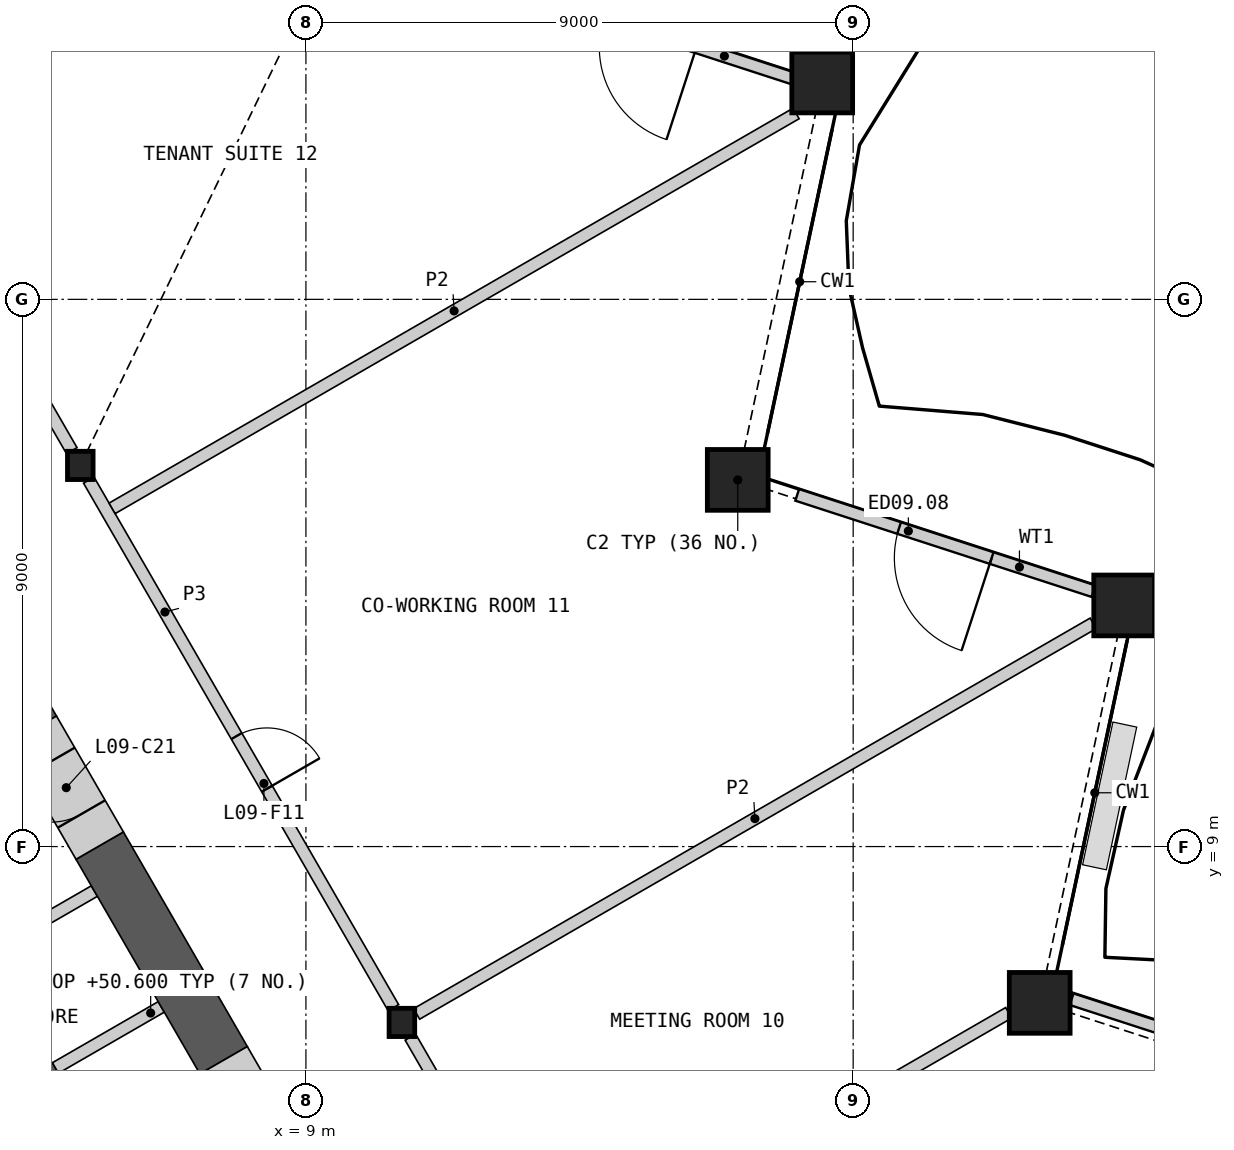
"""IFC4 building model, lengths in metres.
Left out: names, types, materials, properties, quantities, classifications, styles, units other than length and angle.
Written with IfcOpenShell. Run it as: python <this file> out.ifc"""

import sys

from ifc_helpers import new_model, si_unit, direction, frame, frame_2d, origin, origin_2d, place, context, subcontext, project, spatial, polyline, rectangle, hollow_rectangle, i_section, outline, extrude, element, fill, save


model = new_model("IFC4")
c1 = context("Model", 3, precision=1e-05, world=origin(), true_north=direction((0.0, 1.0)))
c2 = subcontext(c1, "Body", "Model", "MODEL_VIEW")
j1 = project(units=[si_unit("LENGTHUNIT", "METRE"), si_unit("PLANEANGLEUNIT", "RADIAN")], contexts=[c1])
p1 = place(None, origin())
s1 = spatial("IfcSite", under=j1, at=p1, CompositionType="ELEMENT")
p2 = place(p1, origin())
s2 = spatial("IfcBuilding", under=s1, at=p2, CompositionType="ELEMENT")
p3 = place(p2, frame((0.0, 0.0, 46.8)))
s3 = spatial("IfcBuildingStorey", under=s2, at=p3, CompositionType="ELEMENT", Elevation=46.8)
for number, where, z_axis, x_axis in (
    (1, (21.068, 6.429, 0.0), (0.0, 0.0, 1.0), (1.0, 0.0, 0.0)),
    (2, (22.457, 12.966, 0.0), (0.0, 0.0, 1.0), (1.0, 0.0, 0.0)),
    (3, (16.102, 15.031, 0.0), (0.0, 0.0, 1.0), (1.0, 0.0, 0.0)),
    (4, (17.491, 21.567, 0.0), (0.0, 0.0, 1.0), (1.0, 0.0, 0.0)),
):
    element("IfcColumn", number, at=place(p3, frame(where, z_axis=z_axis, x_axis=x_axis)), inside=s3, PredefinedType="COLUMN", context=c2, shape_type="SweptSolid", body=[
        extrude(hollow_rectangle(XDim=1.0, YDim=1.0, WallThickness=0.07, at=origin_2d()), origin(), (0.0, 0.0, 1.0), 4.2),
    ])
for number, where, z_axis, x_axis in (
    (5, (10.578, 6.107, 0.0), (0.0, 0.0, 1.0), (1.0, 0.0, 0.0)),
    (6, (5.289, 15.269, 0.0), (0.0, 0.0, 1.0), (1.0, 0.0, 0.0)),
):
    element("IfcColumn", number, at=place(p3, frame(where, z_axis=z_axis, x_axis=x_axis)), inside=s3, PredefinedType="COLUMN", context=c2, shape_type="SweptSolid", body=[
        extrude(i_section(OverallWidth=0.421, OverallDepth=0.465, WebThickness=0.045, FlangeThickness=0.072, at=origin_2d()), origin(), (0.0, 0.0, 1.0), 4.2),
    ])
p4 = place(p3, frame((26.899, 4.765, 0.0), z_axis=(0.0, 0.0, 1.0), x_axis=(-0.951054004345, 0.309024725255, 0.0)))
e7 = element("IfcWall", 7, at=p4, inside=s3, PredefinedType="SOLIDWALL", context=c2, shape_type="SweptSolid", body=[
    extrude(rectangle(XDim=5.579, YDim=0.2, at=frame_2d((2.79, 0.0))), origin(), (0.0, 0.0, 1.0), 3.189),
])
p5 = place(p4, frame((1.86, 0.0, 0.0)))
e8 = element("IfcOpeningElement", 8, at=p5, cuts=e7, PredefinedType="OPENING", context=c2, shape_type="SweptSolid", body=[
    extrude(rectangle(XDim=1.6, YDim=2.4, at=frame_2d((0.8, 1.2))), frame((0.0, 0.11, 0.0), z_axis=(0.0, -1.0, 0.0), x_axis=(1.0, 0.0, 0.0)), (0.0, 0.0, 1.0), 0.22),
])
p6 = place(p3, frame((21.953, 13.2, 0.0), z_axis=(0.0, 0.0, 1.0), x_axis=(-0.951052624268, 0.309028972547, 0.0)))
e9 = element("IfcWall", 9, at=p6, inside=s3, PredefinedType="SOLIDWALL", context=c2, shape_type="SweptSolid", body=[
    extrude(rectangle(XDim=5.124, YDim=0.2, at=frame_2d((2.562, 0.0))), origin(), (0.0, 0.0, 1.0), 3.189),
])
p7 = place(p6, frame((1.762, 0.0, 0.0)))
e10 = element("IfcOpeningElement", 10, at=p7, cuts=e9, PredefinedType="OPENING", context=c2, shape_type="SweptSolid", body=[
    extrude(rectangle(XDim=1.6, YDim=2.4, at=frame_2d((0.8, 1.2))), frame((0.0, 0.11, 0.0), z_axis=(0.0, -1.0, 0.0), x_axis=(1.0, 0.0, 0.0)), (0.0, 0.0, 1.0), 0.22),
])
p8 = place(p3, frame((17.1, 21.605, 0.0), z_axis=(0.0, 0.0, 1.0), x_axis=(-0.951048073862, 0.309042976306, 0.0)))
e11 = element("IfcWall", 11, at=p8, inside=s3, PredefinedType="SOLIDWALL", context=c2, shape_type="SweptSolid", body=[
    extrude(rectangle(XDim=5.124, YDim=0.2, at=frame_2d((2.562, 0.0))), origin(), (0.0, 0.0, 1.0), 3.189),
])
p9 = place(p8, frame((1.762, 0.0, 0.0)))
e12 = element("IfcOpeningElement", 12, at=p9, cuts=e11, PredefinedType="OPENING", context=c2, shape_type="SweptSolid", body=[
    extrude(rectangle(XDim=1.6, YDim=2.4, at=frame_2d((0.8, 1.2))), frame((0.0, 0.11, 0.0), z_axis=(0.0, -1.0, 0.0), x_axis=(1.0, 0.0, 0.0)), (0.0, 0.0, 1.0), 0.22),
])
p10 = place(p3, origin())
e13 = element("IfcWall", 13, at=p10, inside=s3, PredefinedType="SHEAR", context=c2, shape_type="SweptSolid", body=[
    extrude(outline(polyline([(2.66, 4.192), (4.831, 5.445), (8.231, -0.444), (6.061, -1.697), (5.96, -1.524), (7.952, -0.374), (6.952, 1.358), (4.96, 0.208), (4.861, 0.381), (6.852, 1.531), (5.852, 3.263), (3.861, 2.113), (3.76, 2.287), (5.752, 3.437), (4.752, 5.169), (2.76, 4.019), (2.66, 4.192)])), origin(), (0.0, 0.0, 1.0), 3.8),
])
p11 = place(p3, frame((5.817, -1.476, 0.0), z_axis=(0.0, 0.0, 1.0), x_axis=(-0.500002616675, 0.866023893041, 0.0)))
e14 = element("IfcWall", 14, at=p11, inside=s3, PredefinedType="SOLIDWALL", context=c2, shape_type="SweptSolid", body=[
    extrude(rectangle(XDim=8.373, YDim=0.2, at=frame_2d((4.187, 0.0))), origin(), (0.0, 0.0, 1.0), 3.8),
])
p12 = place(p11, frame((0.337, 0.0, 0.0)))
e15 = element("IfcOpeningElement", 15, at=p12, cuts=e14, PredefinedType="OPENING", context=c2, shape_type="SweptSolid", body=[
    extrude(rectangle(XDim=1.1, YDim=2.1, at=frame_2d((0.55, 1.05))), frame((0.0, 0.11, 0.0), z_axis=(0.0, -1.0, 0.0), x_axis=(1.0, 0.0, 0.0)), (0.0, 0.0, 1.0), 0.22),
])
p13 = place(p11, frame((2.537, 0.0, 0.0)))
e16 = element("IfcOpeningElement", 16, at=p13, cuts=e14, PredefinedType="OPENING", context=c2, shape_type="SweptSolid", body=[
    extrude(rectangle(XDim=1.1, YDim=2.1, at=frame_2d((0.55, 1.05))), frame((0.0, 0.11, 0.0), z_axis=(0.0, -1.0, 0.0), x_axis=(1.0, 0.0, 0.0)), (0.0, 0.0, 1.0), 0.22),
])
p14 = place(p11, frame((4.737, 0.0, 0.0)))
e17 = element("IfcOpeningElement", 17, at=p14, cuts=e14, PredefinedType="OPENING", context=c2, shape_type="SweptSolid", body=[
    extrude(rectangle(XDim=1.1, YDim=2.1, at=frame_2d((0.55, 1.05))), frame((0.0, 0.11, 0.0), z_axis=(0.0, -1.0, 0.0), x_axis=(1.0, 0.0, 0.0)), (0.0, 0.0, 1.0), 0.22),
])
p15 = place(p11, frame((7.037, 0.0, 0.0)))
e18 = element("IfcOpeningElement", 18, at=p15, cuts=e14, PredefinedType="OPENING", context=c2, shape_type="SweptSolid", body=[
    extrude(rectangle(XDim=0.9, YDim=2.1, at=frame_2d((0.45, 1.05))), frame((0.0, 0.11, 0.0), z_axis=(0.0, -1.0, 0.0), x_axis=(1.0, 0.0, 0.0)), (0.0, 0.0, 1.0), 0.22),
])
p16 = place(p3, frame((4.881, 5.358, 0.0), z_axis=(0.0, 0.0, 1.0), x_axis=(0.866035824272, 0.499981950752, 0.0)))
e19 = element("IfcWall", 19, at=p16, inside=s3, PredefinedType="SHEAR", context=c2, shape_type="SweptSolid", body=[
    extrude(rectangle(XDim=2.009, YDim=0.2, at=frame_2d((1.004, 0.0))), origin(), (0.0, 0.0, 1.0), 3.8),
])
p17 = place(p3, frame((3.781, 7.263, 0.0), z_axis=(0.0, 0.0, 1.0), x_axis=(0.865983199114, 0.50007309351, 0.0)))
e20 = element("IfcWall", 20, at=p17, inside=s3, PredefinedType="SHEAR", context=c2, shape_type="SweptSolid", body=[
    extrude(rectangle(XDim=2.009, YDim=0.2, at=frame_2d((1.004, 0.0))), origin(), (0.0, 0.0, 1.0), 3.8),
])
p18 = place(p3, frame((7.646, 5.486, 0.0), z_axis=(0.0, 0.0, 1.0), x_axis=(-0.499978218965, 0.866037978706, 0.0)))
e21 = element("IfcWall", 21, at=p18, inside=s3, PredefinedType="SHEAR", context=c2, shape_type="SweptSolid", body=[
    extrude(rectangle(XDim=4.076, YDim=0.9, at=frame_2d((2.038, 0.0))), origin(), (0.0, 0.0, 1.0), 3.8),
])
p19 = place(p3, frame((4.509, 10.921, 0.0), z_axis=(0.0, 0.0, 1.0), x_axis=(-0.49999004381, 0.866031151917, 0.0)))
e22 = element("IfcWall", 22, at=p19, inside=s3, PredefinedType="SHEAR", context=c2, shape_type="SweptSolid", body=[
    extrude(rectangle(XDim=3.975, YDim=0.9, at=frame_2d((1.988, 0.0))), origin(), (0.0, 0.0, 1.0), 3.8),
])
p20 = place(p3, frame((8.747, 3.58, 0.0), z_axis=(0.0, 0.0, 1.0), x_axis=(-0.50002983664, 0.866008176907, 0.0)))
e23 = element("IfcWall", 23, at=p20, inside=s3, PredefinedType="SHEAR", context=c2, shape_type="SweptSolid", body=[
    extrude(rectangle(XDim=2.2, YDim=0.9, at=frame_2d((1.1, 0.0))), origin(), (0.0, 0.0, 1.0), 3.8),
])
p21 = place(p20, frame((0.6, 0.0, 0.0)))
e24 = element("IfcOpeningElement", 24, at=p21, cuts=e23, PredefinedType="OPENING", context=c2, shape_type="SweptSolid", body=[
    extrude(rectangle(XDim=1.0, YDim=2.1, at=frame_2d((0.5, 1.05))), frame((0.0, 0.46, 0.0), z_axis=(0.0, -1.0, 0.0), x_axis=(1.0, 0.0, 0.0)), (0.0, 0.0, 1.0), 0.92),
])
p22 = place(p3, frame((5.608, 9.016, 0.0), z_axis=(0.0, 0.0, 1.0), x_axis=(-0.499994660107, 0.866028486751, 0.0)))
e25 = element("IfcWall", 25, at=p22, inside=s3, PredefinedType="SHEAR", context=c2, shape_type="SweptSolid", body=[
    extrude(rectangle(XDim=2.2, YDim=0.9, at=frame_2d((1.1, 0.0))), origin(), (0.0, 0.0, 1.0), 3.8),
])
p23 = place(p22, frame((0.6, 0.0, 0.0)))
e26 = element("IfcOpeningElement", 26, at=p23, cuts=e25, PredefinedType="OPENING", context=c2, shape_type="SweptSolid", body=[
    extrude(rectangle(XDim=1.0, YDim=2.1, at=frame_2d((0.5, 1.05))), frame((0.0, 0.46, 0.0), z_axis=(0.0, -1.0, 0.0), x_axis=(1.0, 0.0, 0.0)), (0.0, 0.0, 1.0), 0.92),
])
p24 = place(p3, frame((10.719, 5.865, 0.0), z_axis=(0.0, 0.0, 1.0), x_axis=(0.49999175339, -0.866030164915, 0.0)))
e27 = element("IfcWall", 27, at=p24, inside=s3, PredefinedType="PARTITIONING", context=c2, shape_type="SweptSolid", body=[
    extrude(rectangle(XDim=10.019, YDim=0.2, at=frame_2d((5.009, 0.0))), origin(), (0.0, 0.0, 1.0), 3.8),
])
p25 = place(p24, frame((6.464, 0.0, 0.0)))
e28 = element("IfcOpeningElement", 28, at=p25, cuts=e27, PredefinedType="OPENING", context=c2, shape_type="SweptSolid", body=[
    extrude(rectangle(XDim=1.0, YDim=2.1, at=frame_2d((0.5, 1.05))), frame((0.0, 0.11, 0.0), z_axis=(0.0, -1.0, 0.0), x_axis=(1.0, 0.0, 0.0)), (0.0, 0.0, 1.0), 0.22),
])
p26 = place(p24, frame((1.753, 0.0, 0.0)))
e29 = element("IfcOpeningElement", 29, at=p26, cuts=e27, PredefinedType="OPENING", context=c2, shape_type="SweptSolid", body=[
    extrude(rectangle(XDim=1.0, YDim=2.1, at=frame_2d((0.5, 1.05))), frame((0.0, 0.11, 0.0), z_axis=(0.0, -1.0, 0.0), x_axis=(1.0, 0.0, 0.0)), (0.0, 0.0, 1.0), 0.22),
])
p27 = place(p3, frame((5.429, 15.026, 0.0), z_axis=(0.0, 0.0, 1.0), x_axis=(0.50001002959, -0.86601961312, 0.0)))
e30 = element("IfcWall", 30, at=p27, inside=s3, PredefinedType="PARTITIONING", context=c2, shape_type="SweptSolid", body=[
    extrude(rectangle(XDim=10.019, YDim=0.2, at=frame_2d((5.009, 0.0))), origin(), (0.0, 0.0, 1.0), 3.8),
])
p28 = place(p27, frame((4.86, 0.0, 0.0)))
e31 = element("IfcOpeningElement", 31, at=p28, cuts=e30, PredefinedType="OPENING", context=c2, shape_type="SweptSolid", body=[
    extrude(rectangle(XDim=1.0, YDim=2.1, at=frame_2d((0.5, 1.05))), frame((0.0, 0.11, 0.0), z_axis=(0.0, -1.0, 0.0), x_axis=(1.0, 0.0, 0.0)), (0.0, 0.0, 1.0), 0.22),
])
p29 = place(p3, frame((1.913, 21.116, 0.0), z_axis=(0.0, 0.0, 1.0), x_axis=(0.500001069878, -0.866024786089, 0.0)))
e32 = element("IfcWall", 32, at=p29, inside=s3, PredefinedType="PARTITIONING", context=c2, shape_type="SweptSolid", body=[
    extrude(rectangle(XDim=6.473, YDim=0.2, at=frame_2d((3.236, 0.0))), origin(), (0.0, 0.0, 1.0), 3.8),
])
p30 = place(p29, frame((2.787, 0.0, 0.0)))
e33 = element("IfcOpeningElement", 33, at=p30, cuts=e32, PredefinedType="OPENING", context=c2, shape_type="SweptSolid", body=[
    extrude(rectangle(XDim=1.0, YDim=2.1, at=frame_2d((0.5, 1.05))), frame((0.0, 0.11, 0.0), z_axis=(0.0, -1.0, 0.0), x_axis=(1.0, 0.0, 0.0)), (0.0, 0.0, 1.0), 0.22),
])
p31 = place(p3, frame((2.041, 21.093, 0.0), z_axis=(0.0, 0.0, 1.0), x_axis=(0.778730857737, 0.627358152261, 0.0)))
e34 = element("IfcWall", 34, at=p31, inside=s3, PredefinedType="PARTITIONING", context=c2, shape_type="SweptSolid", body=[
    extrude(rectangle(XDim=13.654, YDim=0.2, at=frame_2d((6.827, 0.0))), origin(), (0.0, 0.0, 1.0), 2.885),
])
p32 = place(p3, frame((5.812, 14.562, 0.0), z_axis=(0.0, 0.0, 1.0), x_axis=(0.866020631549, 0.500008265664, 0.0)))
e35 = element("IfcWall", 35, at=p32, inside=s3, PredefinedType="PARTITIONING", context=c2, shape_type="SweptSolid", body=[
    extrude(rectangle(XDim=12.989, YDim=0.2, at=frame_2d((6.495, 0.0))), origin(), (0.0, 0.0, 1.0), 2.885),
])
p33 = place(p3, frame((10.821, 6.247, 0.0), z_axis=(0.0, 0.0, 1.0), x_axis=(0.866026729935, 0.499997703033, 0.0)))
e36 = element("IfcWall", 36, at=p33, inside=s3, PredefinedType="PARTITIONING", context=c2, shape_type="SweptSolid", body=[
    extrude(rectangle(XDim=12.848, YDim=0.2, at=frame_2d((6.424, 0.0))), origin(), (0.0, 0.0, 1.0), 2.885),
])
p34 = place(p3, frame((13.091, 1.955, 0.0), z_axis=(0.0, 0.0, 1.0), x_axis=(0.866026670206, 0.499997806488, 0.0)))
e37 = element("IfcWall", 37, at=p34, inside=s3, PredefinedType="PARTITIONING", context=c2, shape_type="SweptSolid", body=[
    extrude(rectangle(XDim=8.622, YDim=0.2, at=frame_2d((4.311, 0.0))), origin(), (0.0, 0.0, 1.0), 2.885),
])
p35 = place(p7, origin())
e38 = element("IfcDoor", 38, at=p35, inside=s3, OperationType="DOUBLE_DOOR_SINGLE_SWING", PredefinedType="DOOR", context=c2, shape_type="SweptSolid", body=[
    extrude(rectangle(XDim=1.6, YDim=2.4, at=frame_2d((0.8, 1.2))), frame((0.0, 0.025, 0.0), z_axis=(0.0, -1.0, 0.0), x_axis=(1.0, 0.0, 0.0)), (0.0, 0.0, 1.0), 0.05),
])
fill(e10, e38)
p36 = place(p23, origin())
e39 = element("IfcDoor", 39, at=p36, inside=s3, OperationType="SINGLE_SWING_RIGHT", PredefinedType="DOOR", context=c2, shape_type="SweptSolid", body=[
    extrude(rectangle(XDim=1.0, YDim=2.1, at=frame_2d((0.5, 1.05))), frame((0.0, 0.205, 0.0), z_axis=(0.0, -1.0, 0.0), x_axis=(1.0, 0.0, 0.0)), (0.0, 0.0, 1.0), 0.05),
])
fill(e26, e39)
p37 = place(p28, origin())
e40 = element("IfcDoor", 40, at=p37, inside=s3, OperationType="SINGLE_SWING_RIGHT", PredefinedType="DOOR", context=c2, shape_type="SweptSolid", body=[
    extrude(rectangle(XDim=1.0, YDim=2.1, at=frame_2d((0.5, 1.05))), frame((0.0, 0.025, 0.0), z_axis=(0.0, -1.0, 0.0), x_axis=(1.0, 0.0, 0.0)), (0.0, 0.0, 1.0), 0.05),
])
fill(e31, e40)
save(model, sys.argv[1])
